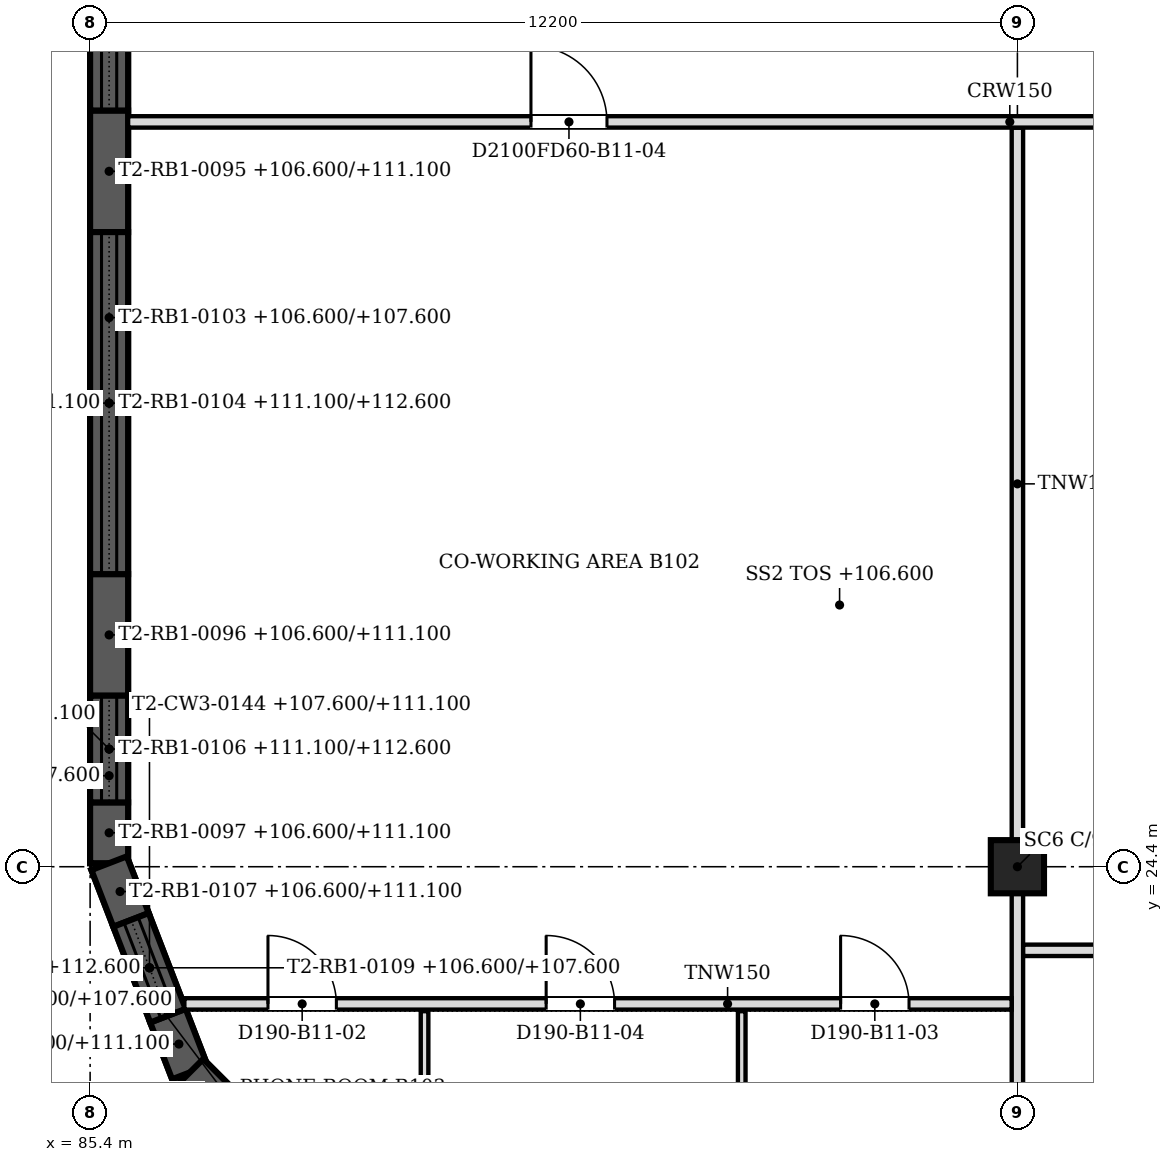
"""IFC4 building model, lengths in metres.
Left out: names, types, materials, properties, quantities, classifications, styles, units other than length and angle.
Written with IfcOpenShell. Run it as: python <this file> out.ifc"""

import sys

from ifc_helpers import new_model, si_unit, direction, frame, frame_2d, origin, origin_2d, place, context, subcontext, project, spatial, polyline, rectangle, outline, extrude, faceted_brep, source, transform, mapped, element, fill, save


model = new_model("IFC4")
c1 = context("Model", 3, precision=1e-05, world=origin(), true_north=direction((0.0, 1.0)))
c2 = subcontext(c1, "Body", "Model", "MODEL_VIEW")
j1 = project(units=[si_unit("LENGTHUNIT", "METRE"), si_unit("PLANEANGLEUNIT", "RADIAN")], contexts=[c1])
p1 = place(None, origin())
s1 = spatial("IfcSite", under=j1, at=p1, CompositionType="ELEMENT")
p2 = place(p1, origin())
s2 = spatial("IfcBuilding", under=s1, at=p2, CompositionType="ELEMENT")
p3 = place(p2, frame((0.0, 0.0, 106.6)))
s3 = spatial("IfcBuildingStorey", under=s2, at=p3, CompositionType="ELEMENT", Elevation=106.6)
p4 = place(p3, frame((97.6, 24.4, 0.0), z_axis=(0.0, 0.0, 1.0), x_axis=(1.0, 0.0, 0.0)))
e1 = element("IfcColumn", 1, at=p4, inside=s3, PredefinedType="COLUMN", context=c2, shape_type="SweptSolid", body=[
    extrude(rectangle(XDim=0.7, YDim=0.7, at=origin_2d()), origin(), (0.0, 0.0, 1.0), 5.7),
])
m1 = source(origin(), c2, "Body", "SweptSolid", [
    extrude(outline(polyline([(0.0, 0.0), (1.6, 0.0), (1.6, 4.5), (0.0, 4.5), (0.0, 0.0)])), frame((0.0, 0.25, 0.0), z_axis=(0.0, -1.0, 0.0), x_axis=(1.0, 0.0, 0.0)), (0.0, 0.0, 1.0), 0.5),
])
for number, where, z_axis, x_axis in (
    (2, (85.65, 34.35, 0.0), (0.0, 0.0, 1.0), (0.0, -1.0, 0.0)),
    (3, (85.65, 28.25, 0.0), (0.0, 0.0, 1.0), (0.0, -1.0, 0.0)),
):
    element("IfcWall", number, at=place(p3, frame(where, z_axis=z_axis, x_axis=x_axis)), inside=s3, PredefinedType="SOLIDWALL", context=c2, shape_type="MappedRepresentation", body=[
        mapped(m1, transform((0.0, 0.0, 0.0), scale=1.0)),
    ])
m2 = source(origin(), c2, "Body", "Brep", [
    faceted_brep([(0.0, -0.25, 0.0), (0.8, -0.25, 0.0), (0.8, -0.25, 4.5), (0.0, -0.25, 4.5), (0.0, 0.25, 4.5), (0.753, 0.25, 4.5), (0.753, 0.25, 0.0), (0.0, 0.25, 0.0), (0.8, -0.0, 0.0), (0.8, -0.0, 4.5)], [[[0, 1, 2, 3]], [[4, 5, 6, 7]], [[7, 6, 8, 1, 0]], [[9, 2, 1, 8]], [[5, 4, 3, 2, 9]], [[4, 7, 0, 3]], [[8, 6, 5, 9]]]),
])
p5 = place(p3, frame((85.65, 25.247, 0.0), z_axis=(0.0, 0.0, 1.0), x_axis=(0.0, -1.0, 0.0)))
e4 = element("IfcWall", 4, at=p5, inside=s3, PredefinedType="SOLIDWALL", context=c2, shape_type="MappedRepresentation", body=[
    mapped(m2, transform((0.0, 0.0, 0.0), scale=1.0)),
])
m3 = source(origin(), c2, "Body", "SweptSolid", [
    extrude(outline(polyline([(0.0, 0.0), (4.5, 0.0), (4.5, 1.0), (0.0, 1.0), (0.0, 0.0)])), frame((0.0, 0.25, 0.0), z_axis=(0.0, -1.0, 0.0), x_axis=(1.0, 0.0, 0.0)), (0.0, 0.0, 1.0), 0.5),
])
p6 = place(p3, frame((85.65, 38.85, 0.0), z_axis=(0.0, 0.0, 1.0), x_axis=(0.0, -1.0, 0.0)))
e5 = element("IfcWall", 5, at=p6, inside=s3, PredefinedType="SOLIDWALL", context=c2, shape_type="MappedRepresentation", body=[
    mapped(m3, transform((0.0, 0.0, 0.0), scale=1.0)),
])
m4 = source(origin(), c2, "Body", "Brep", [
    faceted_brep([(0.0, -0.25, 0.0), (6.1, -0.25, 0.0), (6.1, -0.25, 1.5), (0.0, -0.25, 1.5), (0.0, 0.25, 1.5), (6.1, 0.25, 1.5), (6.1, 0.25, 0.0), (0.0, 0.25, 0.0)], [[[0, 1, 2, 3]], [[4, 5, 6, 7]], [[7, 6, 1, 0]], [[5, 4, 3, 2]], [[4, 7, 0, 3]], [[1, 6, 5, 2]]]),
])
p7 = place(p3, frame((85.65, 39.65, 4.5), z_axis=(0.0, 0.0, 1.0), x_axis=(0.0, -1.0, 0.0)))
e6 = element("IfcWall", 6, at=p7, inside=s3, PredefinedType="SOLIDWALL", context=c2, shape_type="MappedRepresentation", body=[
    mapped(m4, transform((0.0, 0.0, 0.0), scale=1.0)),
])
p8 = place(p3, frame((85.65, 32.75, 0.0), z_axis=(0.0, 0.0, 1.0), x_axis=(0.0, -1.0, 0.0)))
e7 = element("IfcWall", 7, at=p8, inside=s3, PredefinedType="SOLIDWALL", context=c2, shape_type="MappedRepresentation", body=[
    mapped(m3, transform((0.0, 0.0, 0.0), scale=1.0)),
])
m5 = source(origin(), c2, "Body", "SweptSolid", [
    extrude(outline(polyline([(0.0, 0.0), (6.1, 0.0), (6.1, 1.5), (0.0, 1.5), (0.0, 0.0)])), frame((0.0, 0.25, 0.0), z_axis=(0.0, -1.0, 0.0), x_axis=(1.0, 0.0, 0.0)), (0.0, 0.0, 1.0), 0.5),
])
p9 = place(p3, frame((85.65, 33.55, 4.5), z_axis=(0.0, 0.0, 1.0), x_axis=(0.0, -1.0, 0.0)))
e8 = element("IfcWall", 8, at=p9, inside=s3, PredefinedType="SOLIDWALL", context=c2, shape_type="MappedRepresentation", body=[
    mapped(m5, transform((0.0, 0.0, 0.0), scale=1.0)),
])
m6 = source(origin(), c2, "Body", "Brep", [
    faceted_brep([(0.0, -0.25, 0.0), (1.403, -0.25, 0.0), (1.403, -0.25, 1.0), (0.0, -0.25, 1.0), (0.0, 0.25, 1.0), (1.403, 0.25, 1.0), (1.403, 0.25, 0.0), (0.0, 0.25, 0.0)], [[[0, 1, 2, 3]], [[4, 5, 6, 7]], [[7, 6, 1, 0]], [[5, 4, 3, 2]], [[4, 7, 0, 3]], [[1, 6, 5, 2]]]),
])
p10 = place(p3, frame((85.65, 26.65, 0.0), z_axis=(0.0, 0.0, 1.0), x_axis=(0.0, -1.0, 0.0)))
e9 = element("IfcWall", 9, at=p10, inside=s3, PredefinedType="SOLIDWALL", context=c2, shape_type="MappedRepresentation", body=[
    mapped(m6, transform((0.0, 0.0, 0.0), scale=1.0)),
])
m7 = source(origin(), c2, "Body", "Brep", [
    faceted_brep([(0.0, -0.25, 0.0), (3.003, -0.25, 0.0), (3.003, -0.25, 1.5), (0.0, -0.25, 1.5), (0.0, 0.25, 1.5), (2.957, 0.25, 1.5), (2.957, 0.25, 0.0), (0.0, 0.25, 0.0), (3.003, 0.0, 0.0), (3.003, 0.0, 1.5)], [[[0, 1, 2, 3]], [[4, 5, 6, 7]], [[7, 6, 8, 1, 0]], [[9, 2, 1, 8]], [[5, 4, 3, 2, 9]], [[4, 7, 0, 3]], [[8, 6, 5, 9]]]),
])
p11 = place(p3, frame((85.65, 27.45, 4.5), z_axis=(0.0, 0.0, 1.0), x_axis=(0.0, -1.0, 0.0)))
e10 = element("IfcWall", 10, at=p11, inside=s3, PredefinedType="SOLIDWALL", context=c2, shape_type="MappedRepresentation", body=[
    mapped(m7, transform((0.0, 0.0, 0.0), scale=1.0)),
])
m8 = source(origin(), c2, "Body", "Brep", [
    faceted_brep([(0.0, -0.25, 0.0), (0.8, -0.25, 0.0), (0.8, -0.25, 4.5), (0.0, -0.25, 4.5), (0.047, 0.25, 4.5), (0.8, 0.25, 4.5), (0.8, 0.25, 0.0), (0.047, 0.25, 0.0), (0.0, 0.0, 0.0), (0.0, 0.0, 4.5)], [[[0, 1, 2, 3]], [[4, 5, 6, 7]], [[7, 6, 1, 0, 8]], [[5, 4, 9, 3, 2]], [[8, 0, 3, 9]], [[7, 8, 9, 4]], [[1, 6, 5, 2]]]),
])
p12 = place(p3, frame((85.65, 24.447, 0.0), z_axis=(0.0, 0.0, 1.0), x_axis=(0.360103552367, -0.932912338632, 0.0)))
e11 = element("IfcWall", 11, at=p12, inside=s3, PredefinedType="SOLIDWALL", context=c2, shape_type="MappedRepresentation", body=[
    mapped(m8, transform((0.0, 0.0, 0.0), scale=1.0)),
])
m9 = source(origin(), c2, "Body", "Brep", [
    faceted_brep([(0.0, -0.25, 0.0), (0.8, -0.25, 0.0), (0.8, -0.25, 4.5), (0.0, -0.25, 4.5), (0.0, 0.25, 4.5), (0.747, 0.25, 4.5), (0.747, 0.25, 0.0), (0.0, 0.25, 0.0), (0.8, -0.0, 0.0), (0.8, -0.0, 4.5)], [[[0, 1, 2, 3]], [[4, 5, 6, 7]], [[7, 6, 8, 1, 0]], [[9, 2, 1, 8]], [[5, 4, 3, 2, 9]], [[4, 7, 0, 3]], [[8, 6, 5, 9]]]),
])
p13 = place(p3, frame((86.424, 22.44, 0.0), z_axis=(0.0, 0.0, 1.0), x_axis=(0.359735468129, -0.933054335486, 0.0)))
e12 = element("IfcWall", 12, at=p13, inside=s3, PredefinedType="SOLIDWALL", context=c2, shape_type="MappedRepresentation", body=[
    mapped(m9, transform((0.0, 0.0, 0.0), scale=1.0)),
])
m10 = source(origin(), c2, "Body", "SweptSolid", [
    extrude(outline(polyline([(0.0, 0.0), (1.351, 0.0), (1.351, 1.0), (0.0, 1.0), (0.0, 0.0)])), frame((0.0, 0.25, 0.0), z_axis=(0.0, -1.0, 0.0), x_axis=(1.0, 0.0, 0.0)), (0.0, 0.0, 1.0), 0.5),
])
p14 = place(p3, frame((85.938, 23.7, 0.0), z_axis=(0.0, 0.0, 1.0), x_axis=(0.359923772835, -0.932981713512, 0.0)))
e13 = element("IfcWall", 13, at=p14, inside=s3, PredefinedType="SOLIDWALL", context=c2, shape_type="MappedRepresentation", body=[
    mapped(m10, transform((0.0, 0.0, 0.0), scale=1.0)),
])
m11 = source(origin(), c2, "Body", "Brep", [
    faceted_brep([(0.0, -0.25, 0.0), (2.95, -0.25, 0.0), (2.95, -0.25, 1.5), (0.0, -0.25, 1.5), (0.047, 0.25, 1.5), (2.898, 0.25, 1.5), (2.898, 0.25, 0.0), (0.047, 0.25, 0.0), (2.95, 0.0, 0.0), (0.0, 0.0, 0.0), (2.95, 0.0, 1.5), (0.0, 0.0, 1.5)], [[[0, 1, 2, 3]], [[4, 5, 6, 7]], [[7, 6, 8, 1, 0, 9]], [[10, 2, 1, 8]], [[5, 4, 11, 3, 2, 10]], [[9, 0, 3, 11]], [[7, 9, 11, 4]], [[8, 6, 5, 10]]]),
])
p15 = place(p3, frame((85.65, 24.447, 4.5), z_axis=(0.0, 0.0, 1.0), x_axis=(0.359949242603, -0.932971887438, 0.0)))
e14 = element("IfcWall", 14, at=p15, inside=s3, PredefinedType="SOLIDWALL", context=c2, shape_type="MappedRepresentation", body=[
    mapped(m11, transform((0.0, 0.0, 0.0), scale=1.0)),
])
m12 = source(origin(), c2, "Body", "Brep", [
    faceted_brep([(0.0, -0.25, 0.0), (0.8, -0.25, 0.0), (0.8, -0.25, 4.5), (0.0, -0.25, 4.5), (0.053, 0.25, 4.5), (0.8, 0.25, 4.5), (0.8, 0.25, 0.0), (0.053, 0.25, 0.0), (0.0, 0.0, 0.0), (0.0, 0.0, 4.5)], [[[0, 1, 2, 3]], [[4, 5, 6, 7]], [[7, 6, 1, 0, 8]], [[5, 4, 9, 3, 2]], [[8, 0, 3, 9]], [[7, 8, 9, 4]], [[1, 6, 5, 2]]]),
])
p16 = place(p3, frame((86.712, 21.694, 0.0), z_axis=(0.0, 0.0, 1.0), x_axis=(0.706954206636, -0.707259322823, 0.0)))
e15 = element("IfcWall", 15, at=p16, inside=s3, PredefinedType="SOLIDWALL", context=c2, shape_type="MappedRepresentation", body=[
    mapped(m12, transform((0.0, 0.0, 0.0), scale=1.0)),
])
m13 = source(origin(), c2, "Body", "Brep", [
    faceted_brep([(0.0, -0.25, 0.0), (2.944, -0.25, 0.0), (2.944, -0.25, 1.5), (0.0, -0.25, 1.5), (0.053, 0.25, 1.5), (2.891, 0.25, 1.5), (2.891, 0.25, 0.0), (0.053, 0.25, 0.0), (2.944, 0.0, 0.0), (0.0, 0.0, 0.0), (2.944, 0.0, 1.5), (0.0, 0.0, 1.5)], [[[0, 1, 2, 3]], [[4, 5, 6, 7]], [[7, 6, 8, 1, 0, 9]], [[10, 2, 1, 8]], [[5, 4, 11, 3, 2, 10]], [[9, 0, 3, 11]], [[7, 9, 11, 4]], [[8, 6, 5, 10]]]),
])
p17 = place(p3, frame((86.712, 21.694, 4.5), z_axis=(0.0, 0.0, 1.0), x_axis=(0.707106781187, -0.707106781187, 0.0)))
e16 = element("IfcWall", 16, at=p17, inside=s3, PredefinedType="SOLIDWALL", context=c2, shape_type="MappedRepresentation", body=[
    mapped(m13, transform((0.0, 0.0, 0.0), scale=1.0)),
])
p18 = place(p3, frame((93.973, 18.8, 0.0), z_axis=(0.0, 0.0, 1.0), x_axis=(0.0, 1.0, 0.0)))
e17 = element("IfcWall", 17, at=p18, inside=s3, PredefinedType="PARTITIONING", context=c2, shape_type="SweptSolid", body=[
    extrude(rectangle(XDim=3.699, YDim=0.1, at=frame_2d((1.85, 0.0))), origin(), (0.0, 0.0, 1.0), 5.167),
])
p19 = place(p3, frame((97.6, 18.8, 0.0), z_axis=(0.0, 0.0, 1.0), x_axis=(0.0, 1.0, 0.0)))
e18 = element("IfcWall", 18, at=p19, inside=s3, PredefinedType="PARTITIONING", context=c2, shape_type="SweptSolid", body=[
    extrude(rectangle(XDim=5.249, YDim=0.15, at=frame_2d((2.625, 0.0))), origin(), (0.0, 0.0, 1.0), 5.167),
])
p20 = place(p3, frame((89.8, 19.492, 0.0), z_axis=(0.0, 0.0, 1.0), x_axis=(0.0, 1.0, 0.0)))
e19 = element("IfcWall", 19, at=p20, inside=s3, PredefinedType="PARTITIONING", context=c2, shape_type="SweptSolid", body=[
    extrude(rectangle(XDim=3.007, YDim=0.1, at=frame_2d((1.504, 0.0))), origin(), (0.0, 0.0, 1.0), 5.167),
])
p21 = place(p3, frame((97.524, 22.595, 0.0), z_axis=(0.0, 0.0, 1.0), x_axis=(-1.0, 0.0, 0.0)))
e20 = element("IfcWall", 20, at=p21, inside=s3, PredefinedType="PARTITIONING", context=c2, shape_type="SweptSolid", body=[
    extrude(rectangle(XDim=10.884, YDim=0.15, at=frame_2d((5.442, 0.0))), origin(), (0.0, 0.0, 1.0), 5.167),
])
m14 = source(origin(), c2, "Body", "SweptSolid", [
    extrude(rectangle(XDim=0.9, YDim=2.1, at=frame_2d((0.45, 1.05))), frame((0.0, 0.085, 0.0), z_axis=(0.0, -1.0, 0.0), x_axis=(1.0, 0.0, 0.0)), (0.0, 0.0, 1.0), 0.17),
])
p22 = place(p21, frame((8.884, 0.0, 0.0)))
e21 = element("IfcOpeningElement", 21, at=p22, cuts=e20, PredefinedType="OPENING", context=c2, shape_type="MappedRepresentation", body=[
    mapped(m14, transform((0.0, 0.0, 0.0), scale=1.0)),
])
p23 = place(p21, frame((1.35, 0.0, 0.0)))
e22 = element("IfcOpeningElement", 22, at=p23, cuts=e20, PredefinedType="OPENING", context=c2, shape_type="MappedRepresentation", body=[
    mapped(m14, transform((0.0, 0.0, 0.0), scale=1.0)),
])
p24 = place(p21, frame((5.224, 0.0, 0.0)))
e23 = element("IfcOpeningElement", 23, at=p24, cuts=e20, PredefinedType="OPENING", context=c2, shape_type="MappedRepresentation", body=[
    mapped(m14, transform((0.0, 0.0, 0.0), scale=1.0)),
])
p25 = place(p3, frame((109.724, 23.3, 0.0), z_axis=(0.0, 0.0, 1.0), x_axis=(-1.0, 0.0, 0.0)))
e24 = element("IfcWall", 24, at=p25, inside=s3, PredefinedType="PARTITIONING", context=c2, shape_type="SweptSolid", body=[
    extrude(rectangle(XDim=12.048, YDim=0.15, at=frame_2d((6.024, 0.0))), origin(), (0.0, 0.0, 1.0), 5.167),
])
p26 = place(p25, frame((8.648, 0.0, 0.0)))
e25 = element("IfcOpeningElement", 25, at=p26, cuts=e24, PredefinedType="OPENING", context=c2, shape_type="MappedRepresentation", body=[
    mapped(m14, transform((0.0, 0.0, 0.0), scale=1.0)),
])
p27 = place(p25, frame((2.63, 0.0, 0.0)))
e26 = element("IfcOpeningElement", 26, at=p27, cuts=e24, PredefinedType="OPENING", context=c2, shape_type="MappedRepresentation", body=[
    mapped(m14, transform((0.0, 0.0, 0.0), scale=1.0)),
])
p28 = place(p3, frame((97.6, 24.751, 0.0), z_axis=(0.0, 0.0, 1.0), x_axis=(0.0, 1.0, 0.0)))
e27 = element("IfcWall", 27, at=p28, inside=s3, PredefinedType="PARTITIONING", context=c2, shape_type="SweptSolid", body=[
    extrude(rectangle(XDim=9.373, YDim=0.15, at=frame_2d((4.687, 0.0))), origin(), (0.0, 0.0, 1.0), 5.167),
])
p29 = place(p3, frame((121.5, 34.2, 0.0), z_axis=(0.0, 0.0, 1.0), x_axis=(-1.0, 0.0, 0.0)))
e28 = element("IfcWall", 28, at=p29, inside=s3, PredefinedType="PARTITIONING", context=c2, shape_type="SweptSolid", body=[
    extrude(rectangle(XDim=35.6, YDim=0.15, at=frame_2d((17.8, 0.0))), origin(), (0.0, 0.0, 1.0), 5.167),
])
m15 = source(origin(), c2, "Body", "SweptSolid", [
    extrude(rectangle(XDim=1.8, YDim=2.1, at=frame_2d((0.9, 1.05))), frame((0.0, 0.085, 0.0), z_axis=(0.0, -1.0, 0.0), x_axis=(1.0, 0.0, 0.0)), (0.0, 0.0, 1.0), 0.17),
])
p30 = place(p29, frame((1.699, 0.0, 0.0)))
e29 = element("IfcOpeningElement", 29, at=p30, cuts=e28, PredefinedType="OPENING", context=c2, shape_type="MappedRepresentation", body=[
    mapped(m15, transform((0.0, 0.0, 0.0), scale=1.0)),
])
m16 = source(origin(), c2, "Body", "SweptSolid", [
    extrude(rectangle(XDim=1.0, YDim=2.1, at=frame_2d((0.5, 1.05))), frame((0.0, 0.085, 0.0), z_axis=(0.0, -1.0, 0.0), x_axis=(1.0, 0.0, 0.0)), (0.0, 0.0, 1.0), 0.17),
])
p31 = place(p29, frame((7.899, 0.0, 0.0)))
e30 = element("IfcOpeningElement", 30, at=p31, cuts=e28, PredefinedType="OPENING", context=c2, shape_type="MappedRepresentation", body=[
    mapped(m16, transform((0.0, 0.0, 0.0), scale=1.0)),
])
p32 = place(p29, frame((29.3, 0.0, 0.0)))
e31 = element("IfcOpeningElement", 31, at=p32, cuts=e28, PredefinedType="OPENING", context=c2, shape_type="MappedRepresentation", body=[
    mapped(m16, transform((0.0, 0.0, 0.0), scale=1.0)),
])
p33 = place(p29, frame((16.9, 0.0, 0.0)))
e32 = element("IfcOpeningElement", 32, at=p33, cuts=e28, PredefinedType="OPENING", context=c2, shape_type="MappedRepresentation", body=[
    mapped(m15, transform((0.0, 0.0, 0.0), scale=1.0)),
])
m17 = source(origin(), c2, "Body", "SweptSolid", [
    extrude(rectangle(XDim=0.9, YDim=2.1, at=frame_2d((0.45, 1.05))), frame((0.0, 0.025, 0.0), z_axis=(0.0, -1.0, 0.0), x_axis=(1.0, 0.0, 0.0)), (0.0, 0.0, 1.0), 0.05),
])
p34 = place(p22, origin())
e33 = element("IfcDoor", 33, at=p34, inside=s3, OperationType="SINGLE_SWING_RIGHT", PredefinedType="DOOR", context=c2, shape_type="MappedRepresentation", body=[
    mapped(m17, transform((0.0, 0.0, 0.0), scale=1.0)),
])
fill(e21, e33)
p35 = place(p23, origin())
e34 = element("IfcDoor", 34, at=p35, inside=s3, OperationType="SINGLE_SWING_RIGHT", PredefinedType="DOOR", context=c2, shape_type="MappedRepresentation", body=[
    mapped(m17, transform((0.0, 0.0, 0.0), scale=1.0)),
])
fill(e22, e34)
p36 = place(p24, origin())
e35 = element("IfcDoor", 35, at=p36, inside=s3, OperationType="SINGLE_SWING_RIGHT", PredefinedType="DOOR", context=c2, shape_type="MappedRepresentation", body=[
    mapped(m17, transform((0.0, 0.0, 0.0), scale=1.0)),
])
fill(e23, e35)
m18 = source(origin(), c2, "Body", "SweptSolid", [
    extrude(rectangle(XDim=1.0, YDim=2.1, at=frame_2d((0.5, 1.05))), frame((0.0, 0.025, 0.0), z_axis=(0.0, -1.0, 0.0), x_axis=(1.0, 0.0, 0.0)), (0.0, 0.0, 1.0), 0.05),
])
p37 = place(p32, origin())
e36 = element("IfcDoor", 36, at=p37, inside=s3, OperationType="SINGLE_SWING_RIGHT", PredefinedType="DOOR", context=c2, shape_type="MappedRepresentation", body=[
    mapped(m18, transform((0.0, 0.0, 0.0), scale=1.0)),
])
fill(e31, e36)
save(model, sys.argv[1])
